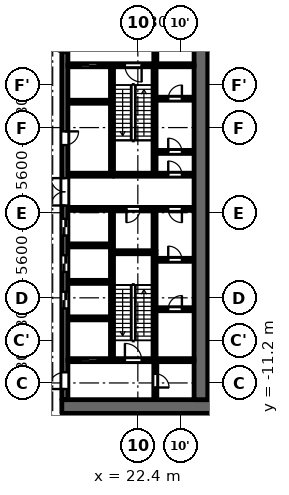
"""IFC4 building model, lengths in metres.
Left out: names, types, materials, properties, quantities, classifications, styles, units other than length and angle.
Written with IfcOpenShell. Run it as: python <this file> out.ifc"""

import sys

from ifc_helpers import new_model, si_unit, direction, frame, frame_2d, origin, place, context, subcontext, project, spatial, rectangle, extrude, element, fill, save


model = new_model("IFC4")
c1 = context("Model", 3, precision=1e-05, world=origin(), true_north=direction((0.0, 1.0)))
c2 = subcontext(c1, "Body", "Model", "MODEL_VIEW")
j1 = project(units=[si_unit("LENGTHUNIT", "METRE"), si_unit("PLANEANGLEUNIT", "RADIAN")], contexts=[c1])
p1 = place(None, origin())
s1 = spatial("IfcSite", under=j1, at=p1, CompositionType="ELEMENT")
p2 = place(p1, origin())
s2 = spatial("IfcBuilding", under=s1, at=p2, CompositionType="ELEMENT")
p3 = place(p2, frame((0.0, 0.0, 25.7)))
s3 = spatial("IfcBuildingStorey", under=s2, at=p3, CompositionType="ELEMENT", Elevation=25.7)
p4 = place(p3, frame((23.5, -2.5, 0.0), z_axis=(0.0, 0.0, 1.0), x_axis=(0.0, 1.0, 0.0)))
e1 = element("IfcWall", 1, at=p4, inside=s3, PredefinedType="PARTITIONING", context=c2, shape_type="SweptSolid", body=[
    extrude(rectangle(XDim=2.65, YDim=0.2, at=frame_2d((1.325, 0.0))), origin(), (0.0, 0.0, 1.0), 4.45),
])
p5 = place(p3, frame((20.7, 2.6, 0.0), z_axis=(0.0, 0.0, 1.0), x_axis=(0.0, 1.0, 0.0)))
e2 = element("IfcWall", 2, at=p5, inside=s3, PredefinedType="SHEAR", context=c2, shape_type="SweptSolid", body=[
    extrude(rectangle(XDim=7.0, YDim=0.2, at=frame_2d((3.5, 0.0))), origin(), (0.0, 0.0, 1.0), 4.45),
])
p6 = place(p3, frame((20.7, -9.6, 0.0), z_axis=(0.0, 0.0, 1.0), x_axis=(0.0, 1.0, 0.0)))
e3 = element("IfcWall", 3, at=p6, inside=s3, PredefinedType="SHEAR", context=c2, shape_type="SweptSolid", body=[
    extrude(rectangle(XDim=9.75, YDim=0.2, at=frame_2d((4.875, 0.0))), origin(), (0.0, 0.0, 1.0), 4.45),
])
p7 = place(p3, frame((20.8, 2.5, 0.0), z_axis=(0.0, 0.0, 1.0), x_axis=(1.0, 0.0, 0.0)))
e4 = element("IfcWall", 4, at=p7, inside=s3, PredefinedType="SHEAR", context=c2, shape_type="SweptSolid", body=[
    extrude(rectangle(XDim=5.3, YDim=0.2, at=frame_2d((2.65, 0.0))), origin(), (0.0, 0.0, 1.0), 4.45),
])
p8 = place(p7, frame((3.6, 0.0, 0.0)))
e5 = element("IfcOpeningElement", 5, at=p8, cuts=e4, PredefinedType="OPENING", context=c2, shape_type="SweptSolid", body=[
    extrude(rectangle(XDim=0.9, YDim=2.1, at=frame_2d((0.45, 1.05))), frame((0.0, 0.11, 0.0), z_axis=(0.0, -1.0, 0.0), x_axis=(1.0, 0.0, 0.0)), (0.0, 0.0, 1.0), 0.22),
])
p9 = place(p3, frame((20.8, 0.25, 0.0), z_axis=(0.0, 0.0, 1.0), x_axis=(1.0, 0.0, 0.0)))
e6 = element("IfcWall", 6, at=p9, inside=s3, PredefinedType="PARTITIONING", context=c2, shape_type="SweptSolid", body=[
    extrude(rectangle(XDim=5.3, YDim=0.2, at=frame_2d((2.65, 0.0))), origin(), (0.0, 0.0, 1.0), 4.45),
])
p10 = place(p9, frame((0.85, 0.0, 0.0)))
e7 = element("IfcOpeningElement", 7, at=p10, cuts=e6, PredefinedType="OPENING", context=c2, shape_type="SweptSolid", body=[
    extrude(rectangle(XDim=0.9, YDim=2.1, at=frame_2d((0.45, 1.05))), frame((0.0, 0.11, 0.0), z_axis=(0.0, -1.0, 0.0), x_axis=(1.0, 0.0, 0.0)), (0.0, 0.0, 1.0), 0.22),
])
p11 = place(p9, frame((3.6, 0.0, 0.0)))
e8 = element("IfcOpeningElement", 8, at=p11, cuts=e6, PredefinedType="OPENING", context=c2, shape_type="SweptSolid", body=[
    extrude(rectangle(XDim=0.9, YDim=2.1, at=frame_2d((0.45, 1.05))), frame((0.0, 0.11, 0.0), z_axis=(0.0, -1.0, 0.0), x_axis=(1.0, 0.0, 0.0)), (0.0, 0.0, 1.0), 0.22),
])
p12 = place(p3, frame((17.4, -12.75, 0.0), z_axis=(0.0, 0.0, 1.0), x_axis=(1.0, 0.0, 0.0)))
e9 = element("IfcWall", 9, at=p12, inside=s3, PredefinedType="SHEAR", context=c2, shape_type="SweptSolid", body=[
    extrude(rectangle(XDim=10.4, YDim=0.9, at=frame_2d((5.2, 0.0))), origin(), (0.0, 0.0, 1.0), 4.45),
])
p13 = place(p3, frame((17.6, -12.3, 0.0), z_axis=(0.0, 0.0, 1.0), x_axis=(0.0, 1.0, 0.0)))
e10 = element("IfcWall", 10, at=p13, inside=s3, PredefinedType="SHEAR", context=c2, shape_type="SweptSolid", body=[
    extrude(rectangle(XDim=24.6, YDim=0.4, at=frame_2d((12.3, 0.0))), origin(), (0.0, 0.0, 1.0), 4.45),
])
p14 = place(p13, frame((6.0, 0.0, 0.0)))
e11 = element("IfcOpeningElement", 11, at=p14, cuts=e10, PredefinedType="OPENING", context=c2, shape_type="SweptSolid", body=[
    extrude(rectangle(XDim=1.1, YDim=2.1, at=frame_2d((0.55, 1.05))), frame((0.0, 0.21, 0.0), z_axis=(0.0, -1.0, 0.0), x_axis=(1.0, 0.0, 0.0)), (0.0, 0.0, 1.0), 0.42),
])
p15 = place(p13, frame((8.4, 0.0, 0.0)))
e12 = element("IfcOpeningElement", 12, at=p15, cuts=e10, PredefinedType="OPENING", context=c2, shape_type="SweptSolid", body=[
    extrude(rectangle(XDim=1.1, YDim=2.1, at=frame_2d((0.55, 1.05))), frame((0.0, 0.21, 0.0), z_axis=(0.0, -1.0, 0.0), x_axis=(1.0, 0.0, 0.0)), (0.0, 0.0, 1.0), 0.42),
])
p16 = place(p13, frame((10.8, 0.0, 0.0)))
e13 = element("IfcOpeningElement", 13, at=p16, cuts=e10, PredefinedType="OPENING", context=c2, shape_type="SweptSolid", body=[
    extrude(rectangle(XDim=1.1, YDim=2.1, at=frame_2d((0.55, 1.05))), frame((0.0, 0.21, 0.0), z_axis=(0.0, -1.0, 0.0), x_axis=(1.0, 0.0, 0.0)), (0.0, 0.0, 1.0), 0.42),
])
p17 = place(p13, frame((16.75, 0.0, 0.0)))
e14 = element("IfcOpeningElement", 14, at=p17, cuts=e10, PredefinedType="OPENING", context=c2, shape_type="SweptSolid", body=[
    extrude(rectangle(XDim=0.9, YDim=2.1, at=frame_2d((0.45, 1.05))), frame((0.0, 0.21, 0.0), z_axis=(0.0, -1.0, 0.0), x_axis=(1.0, 0.0, 0.0)), (0.0, 0.0, 1.0), 0.42),
])
p18 = place(p13, frame((22.8, 0.0, 0.0)))
e15 = element("IfcOpeningElement", 15, at=p18, cuts=e10, PredefinedType="OPENING", context=c2, shape_type="SweptSolid", body=[
    extrude(rectangle(XDim=1.1, YDim=2.1, at=frame_2d((0.55, 1.05))), frame((0.0, 0.21, 0.0), z_axis=(0.0, -1.0, 0.0), x_axis=(1.0, 0.0, 0.0)), (0.0, 0.0, 1.0), 0.42),
])
p19 = place(p13, frame((0.7, 0.0, 0.0)))
e16 = element("IfcOpeningElement", 16, at=p19, cuts=e10, PredefinedType="OPENING", context=c2, shape_type="SweptSolid", body=[
    extrude(rectangle(XDim=1.1, YDim=2.1, at=frame_2d((0.55, 1.05))), frame((0.0, 0.21, 0.0), z_axis=(0.0, -1.0, 0.0), x_axis=(1.0, 0.0, 0.0)), (0.0, 0.0, 1.0), 0.42),
])
p20 = place(p13, frame((12.775, 0.0, 0.0)))
e17 = element("IfcOpeningElement", 17, at=p20, cuts=e10, PredefinedType="OPENING", context=c2, shape_type="SweptSolid", body=[
    extrude(rectangle(XDim=1.8, YDim=2.1, at=frame_2d((0.9, 1.05))), frame((0.0, 0.21, 0.0), z_axis=(0.0, -1.0, 0.0), x_axis=(1.0, 0.0, 0.0)), (0.0, 0.0, 1.0), 0.42),
])
p21 = place(p3, frame((26.55, -12.3, 0.0), z_axis=(0.0, 0.0, 1.0), x_axis=(0.0, 1.0, 0.0)))
e18 = element("IfcWall", 18, at=p21, inside=s3, PredefinedType="SHEAR", context=c2, shape_type="SweptSolid", body=[
    extrude(rectangle(XDim=24.6, YDim=0.9, at=frame_2d((12.3, 0.0))), origin(), (0.0, 0.0, 1.0), 4.45),
])
p22 = place(p3, frame((23.55, 9.8, 0.0), z_axis=(0.0, 0.0, 1.0), x_axis=(0.0, 1.0, 0.0)))
e19 = element("IfcWall", 19, at=p22, inside=s3, PredefinedType="PARTITIONING", context=c2, shape_type="SweptSolid", body=[
    extrude(rectangle(XDim=2.5, YDim=0.2, at=frame_2d((1.25, 0.0))), origin(), (0.0, 0.0, 1.0), 4.45),
])
p23 = place(p22, frame((0.8, 0.0, 0.0)))
e20 = element("IfcOpeningElement", 20, at=p23, cuts=e19, PredefinedType="OPENING", context=c2, shape_type="SweptSolid", body=[
    extrude(rectangle(XDim=0.9, YDim=2.1, at=frame_2d((0.45, 1.05))), frame((0.0, 0.11, 0.0), z_axis=(0.0, -1.0, 0.0), x_axis=(1.0, 0.0, 0.0)), (0.0, 0.0, 1.0), 0.22),
])
p24 = place(p3, frame((23.55, -12.3, 0.0), z_axis=(0.0, 0.0, 1.0), x_axis=(0.0, 1.0, 0.0)))
e21 = element("IfcWall", 21, at=p24, inside=s3, PredefinedType="PARTITIONING", context=c2, shape_type="SweptSolid", body=[
    extrude(rectangle(XDim=2.5, YDim=0.2, at=frame_2d((1.25, 0.0))), origin(), (0.0, 0.0, 1.0), 4.45),
])
p25 = place(p24, frame((0.8, 0.0, 0.0)))
e22 = element("IfcOpeningElement", 22, at=p25, cuts=e21, PredefinedType="OPENING", context=c2, shape_type="SweptSolid", body=[
    extrude(rectangle(XDim=0.9, YDim=2.1, at=frame_2d((0.45, 1.05))), frame((0.0, 0.11, 0.0), z_axis=(0.0, -1.0, 0.0), x_axis=(1.0, 0.0, 0.0)), (0.0, 0.0, 1.0), 0.22),
])
p26 = place(p3, frame((23.6, -6.35, 0.0), z_axis=(0.0, 0.0, 1.0), x_axis=(1.0, 0.0, 0.0)))
e23 = element("IfcWall", 23, at=p26, inside=s3, PredefinedType="PARTITIONING", context=c2, shape_type="SweptSolid", body=[
    extrude(rectangle(XDim=2.5, YDim=0.2, at=frame_2d((1.25, 0.0))), origin(), (0.0, 0.0, 1.0), 4.45),
])
p27 = place(p26, frame((0.8, 0.0, 0.0)))
e24 = element("IfcOpeningElement", 24, at=p27, cuts=e23, PredefinedType="OPENING", context=c2, shape_type="SweptSolid", body=[
    extrude(rectangle(XDim=0.9, YDim=2.1, at=frame_2d((0.45, 1.05))), frame((0.0, 0.11, 0.0), z_axis=(0.0, -1.0, 0.0), x_axis=(1.0, 0.0, 0.0)), (0.0, 0.0, 1.0), 0.22),
])
p28 = place(p3, frame((23.6, -3.1, 0.0), z_axis=(0.0, 0.0, 1.0), x_axis=(1.0, 0.0, 0.0)))
e25 = element("IfcWall", 25, at=p28, inside=s3, PredefinedType="PARTITIONING", context=c2, shape_type="SweptSolid", body=[
    extrude(rectangle(XDim=2.5, YDim=0.2, at=frame_2d((1.25, 0.0))), origin(), (0.0, 0.0, 1.0), 4.45),
])
p29 = place(p28, frame((0.8, 0.0, 0.0)))
e26 = element("IfcOpeningElement", 26, at=p29, cuts=e25, PredefinedType="OPENING", context=c2, shape_type="SweptSolid", body=[
    extrude(rectangle(XDim=0.9, YDim=2.1, at=frame_2d((0.45, 1.05))), frame((0.0, 0.11, 0.0), z_axis=(0.0, -1.0, 0.0), x_axis=(1.0, 0.0, 0.0)), (0.0, 0.0, 1.0), 0.22),
])
p30 = place(p3, frame((23.6, 4.0, 0.0), z_axis=(0.0, 0.0, 1.0), x_axis=(1.0, 0.0, 0.0)))
e27 = element("IfcWall", 27, at=p30, inside=s3, PredefinedType="PARTITIONING", context=c2, shape_type="SweptSolid", body=[
    extrude(rectangle(XDim=2.5, YDim=0.2, at=frame_2d((1.25, 0.0))), origin(), (0.0, 0.0, 1.0), 4.45),
])
p31 = place(p30, frame((0.8, 0.0, 0.0)))
e28 = element("IfcOpeningElement", 28, at=p31, cuts=e27, PredefinedType="OPENING", context=c2, shape_type="SweptSolid", body=[
    extrude(rectangle(XDim=0.9, YDim=2.1, at=frame_2d((0.45, 1.05))), frame((0.0, 0.11, 0.0), z_axis=(0.0, -1.0, 0.0), x_axis=(1.0, 0.0, 0.0)), (0.0, 0.0, 1.0), 0.22),
])
p32 = place(p3, frame((23.6, 7.5, 0.0), z_axis=(0.0, 0.0, 1.0), x_axis=(1.0, 0.0, 0.0)))
e29 = element("IfcWall", 29, at=p32, inside=s3, PredefinedType="PARTITIONING", context=c2, shape_type="SweptSolid", body=[
    extrude(rectangle(XDim=2.5, YDim=0.2, at=frame_2d((1.25, 0.0))), origin(), (0.0, 0.0, 1.0), 4.45),
])
p33 = place(p32, frame((0.8, 0.0, 0.0)))
e30 = element("IfcOpeningElement", 30, at=p33, cuts=e29, PredefinedType="OPENING", context=c2, shape_type="SweptSolid", body=[
    extrude(rectangle(XDim=0.9, YDim=2.1, at=frame_2d((0.45, 1.05))), frame((0.0, 0.11, 0.0), z_axis=(0.0, -1.0, 0.0), x_axis=(1.0, 0.0, 0.0)), (0.0, 0.0, 1.0), 0.22),
])
p34 = place(p3, frame((17.8, -9.7, 0.0), z_axis=(0.0, 0.0, 1.0), x_axis=(1.0, 0.0, 0.0)))
e31 = element("IfcWall", 31, at=p34, inside=s3, PredefinedType="SHEAR", context=c2, shape_type="SweptSolid", body=[
    extrude(rectangle(XDim=8.3, YDim=0.2, at=frame_2d((4.15, 0.0))), origin(), (0.0, 0.0, 1.0), 4.45),
])
p35 = place(p34, frame((0.85, 0.0, 0.0)))
e32 = element("IfcOpeningElement", 32, at=p35, cuts=e31, PredefinedType="OPENING", context=c2, shape_type="SweptSolid", body=[
    extrude(rectangle(XDim=1.1, YDim=2.1, at=frame_2d((0.55, 1.05))), frame((0.0, 0.11, 0.0), z_axis=(0.0, -1.0, 0.0), x_axis=(1.0, 0.0, 0.0)), (0.0, 0.0, 1.0), 0.22),
])
p36 = place(p34, frame((3.75, 0.0, 0.0)))
e33 = element("IfcOpeningElement", 33, at=p36, cuts=e31, PredefinedType="OPENING", context=c2, shape_type="SweptSolid", body=[
    extrude(rectangle(XDim=1.1, YDim=2.1, at=frame_2d((0.55, 1.05))), frame((0.0, 0.11, 0.0), z_axis=(0.0, -1.0, 0.0), x_axis=(1.0, 0.0, 0.0)), (0.0, 0.0, 1.0), 0.22),
])
for number, where, z_axis, x_axis in (
    (34, (17.8, -6.95, 0.0), (0.0, 0.0, 1.0), (1.0, 0.0, 0.0)),
    (35, (17.8, -4.55, 0.0), (0.0, 0.0, 1.0), (1.0, 0.0, 0.0)),
    (36, (17.8, -2.15, 0.0), (0.0, 0.0, 1.0), (1.0, 0.0, 0.0)),
):
    element("IfcWall", number, at=place(p3, frame(where, z_axis=z_axis, x_axis=x_axis)), inside=s3, PredefinedType="PARTITIONING", context=c2, shape_type="SweptSolid", body=[
        extrude(rectangle(XDim=2.8, YDim=0.2, at=frame_2d((1.4, 0.0))), origin(), (0.0, 0.0, 1.0), 4.45),
    ])
for number, where, z_axis, x_axis in (
    (37, (17.8, 0.25, 0.0), (0.0, 0.0, 1.0), (1.0, 0.0, 0.0)),
    (38, (17.8, 2.5, 0.0), (0.0, 0.0, 1.0), (1.0, 0.0, 0.0)),
):
    element("IfcWall", number, at=place(p3, frame(where, z_axis=z_axis, x_axis=x_axis)), inside=s3, PredefinedType="PARTITIONING", context=c2, shape_type="SweptSolid", body=[
        extrude(rectangle(XDim=3.0, YDim=0.2, at=frame_2d((1.5, 0.0))), origin(), (0.0, 0.0, 1.0), 4.45),
    ])
p37 = place(p3, frame((17.8, 7.3, 0.0), z_axis=(0.0, 0.0, 1.0), x_axis=(1.0, 0.0, 0.0)))
e39 = element("IfcWall", 39, at=p37, inside=s3, PredefinedType="PARTITIONING", context=c2, shape_type="SweptSolid", body=[
    extrude(rectangle(XDim=2.8, YDim=0.2, at=frame_2d((1.4, 0.0))), origin(), (0.0, 0.0, 1.0), 4.45),
])
p38 = place(p3, frame((17.8, 9.7, 0.0), z_axis=(0.0, 0.0, 1.0), x_axis=(1.0, 0.0, 0.0)))
e40 = element("IfcWall", 40, at=p38, inside=s3, PredefinedType="SHEAR", context=c2, shape_type="SweptSolid", body=[
    extrude(rectangle(XDim=8.3, YDim=0.2, at=frame_2d((4.15, 0.0))), origin(), (0.0, 0.0, 1.0), 4.45),
])
p39 = place(p38, frame((0.85, 0.0, 0.0)))
e41 = element("IfcOpeningElement", 41, at=p39, cuts=e40, PredefinedType="OPENING", context=c2, shape_type="SweptSolid", body=[
    extrude(rectangle(XDim=1.1, YDim=2.1, at=frame_2d((0.55, 1.05))), frame((0.0, 0.11, 0.0), z_axis=(0.0, -1.0, 0.0), x_axis=(1.0, 0.0, 0.0)), (0.0, 0.0, 1.0), 0.22),
])
p40 = place(p38, frame((3.75, 0.0, 0.0)))
e42 = element("IfcOpeningElement", 42, at=p40, cuts=e40, PredefinedType="OPENING", context=c2, shape_type="SweptSolid", body=[
    extrude(rectangle(XDim=1.1, YDim=2.1, at=frame_2d((0.55, 1.05))), frame((0.0, 0.11, 0.0), z_axis=(0.0, -1.0, 0.0), x_axis=(1.0, 0.0, 0.0)), (0.0, 0.0, 1.0), 0.22),
])
p41 = place(p3, frame((23.5, 2.6, 0.0), z_axis=(0.0, 0.0, 1.0), x_axis=(0.0, 1.0, 0.0)))
e43 = element("IfcWall", 43, at=p41, inside=s3, PredefinedType="SHEAR", context=c2, shape_type="SweptSolid", body=[
    extrude(rectangle(XDim=7.0, YDim=0.2, at=frame_2d((3.5, 0.0))), origin(), (0.0, 0.0, 1.0), 4.45),
])
p42 = place(p3, frame((23.5, -9.6, 0.0), z_axis=(0.0, 0.0, 1.0), x_axis=(0.0, 1.0, 0.0)))
e44 = element("IfcWall", 44, at=p42, inside=s3, PredefinedType="SHEAR", context=c2, shape_type="SweptSolid", body=[
    extrude(rectangle(XDim=6.9, YDim=0.2, at=frame_2d((3.45, 0.0))), origin(), (0.0, 0.0, 1.0), 4.45),
])
p43 = place(p3, frame((20.8, -2.6, 0.0), z_axis=(0.0, 0.0, 1.0), x_axis=(1.0, 0.0, 0.0)))
e45 = element("IfcWall", 45, at=p43, inside=s3, PredefinedType="SHEAR", context=c2, shape_type="SweptSolid", body=[
    extrude(rectangle(XDim=2.8, YDim=0.2, at=frame_2d((1.4, 0.0))), origin(), (0.0, 0.0, 1.0), 4.45),
])
p44 = place(p35, origin())
e46 = element("IfcDoor", 46, at=p44, inside=s3, OperationType="DOUBLE_DOOR_SLIDING", PredefinedType="DOOR", context=c2, shape_type="SweptSolid", body=[
    extrude(rectangle(XDim=1.1, YDim=2.1, at=frame_2d((0.55, 1.05))), frame((0.0, 0.025, 0.0), z_axis=(0.0, -1.0, 0.0), x_axis=(1.0, 0.0, 0.0)), (0.0, 0.0, 1.0), 0.05),
])
fill(e32, e46)
p45 = place(p14, origin())
e47 = element("IfcDoor", 47, at=p45, inside=s3, OperationType="DOUBLE_DOOR_SLIDING", PredefinedType="DOOR", context=c2, shape_type="SweptSolid", body=[
    extrude(rectangle(XDim=1.1, YDim=2.1, at=frame_2d((0.55, 1.05))), frame((0.0, 0.025, 0.0), z_axis=(0.0, -1.0, 0.0), x_axis=(1.0, 0.0, 0.0)), (0.0, 0.0, 1.0), 0.05),
])
fill(e11, e47)
p46 = place(p15, origin())
e48 = element("IfcDoor", 48, at=p46, inside=s3, OperationType="DOUBLE_DOOR_SLIDING", PredefinedType="DOOR", context=c2, shape_type="SweptSolid", body=[
    extrude(rectangle(XDim=1.1, YDim=2.1, at=frame_2d((0.55, 1.05))), frame((0.0, 0.025, 0.0), z_axis=(0.0, -1.0, 0.0), x_axis=(1.0, 0.0, 0.0)), (0.0, 0.0, 1.0), 0.05),
])
fill(e12, e48)
p47 = place(p16, origin())
e49 = element("IfcDoor", 49, at=p47, inside=s3, OperationType="DOUBLE_DOOR_SLIDING", PredefinedType="DOOR", context=c2, shape_type="SweptSolid", body=[
    extrude(rectangle(XDim=1.1, YDim=2.1, at=frame_2d((0.55, 1.05))), frame((0.0, 0.025, 0.0), z_axis=(0.0, -1.0, 0.0), x_axis=(1.0, 0.0, 0.0)), (0.0, 0.0, 1.0), 0.05),
])
fill(e13, e49)
p48 = place(p17, origin())
e50 = element("IfcDoor", 50, at=p48, inside=s3, OperationType="SINGLE_SWING_RIGHT", PredefinedType="DOOR", context=c2, shape_type="SweptSolid", body=[
    extrude(rectangle(XDim=0.9, YDim=2.1, at=frame_2d((0.45, 1.05))), frame((0.0, 0.025, 0.0), z_axis=(0.0, -1.0, 0.0), x_axis=(1.0, 0.0, 0.0)), (0.0, 0.0, 1.0), 0.05),
])
fill(e14, e50)
p49 = place(p39, origin())
e51 = element("IfcDoor", 51, at=p49, inside=s3, OperationType="DOUBLE_DOOR_SLIDING", PredefinedType="DOOR", context=c2, shape_type="SweptSolid", body=[
    extrude(rectangle(XDim=1.1, YDim=2.1, at=frame_2d((0.55, 1.05))), frame((0.0, 0.025, 0.0), z_axis=(0.0, -1.0, 0.0), x_axis=(1.0, 0.0, 0.0)), (0.0, 0.0, 1.0), 0.05),
])
fill(e41, e51)
p50 = place(p18, origin())
e52 = element("IfcDoor", 52, at=p50, inside=s3, OperationType="SINGLE_SWING_LEFT", PredefinedType="DOOR", context=c2, shape_type="SweptSolid", body=[
    extrude(rectangle(XDim=1.1, YDim=2.1, at=frame_2d((0.55, 1.05))), frame((0.0, 0.025, 0.0), z_axis=(0.0, -1.0, 0.0), x_axis=(1.0, 0.0, 0.0)), (0.0, 0.0, 1.0), 0.05),
])
fill(e15, e52)
p51 = place(p19, origin())
e53 = element("IfcDoor", 53, at=p51, inside=s3, OperationType="SINGLE_SWING_RIGHT", PredefinedType="DOOR", context=c2, shape_type="SweptSolid", body=[
    extrude(rectangle(XDim=1.1, YDim=2.1, at=frame_2d((0.55, 1.05))), frame((0.0, 0.025, 0.0), z_axis=(0.0, -1.0, 0.0), x_axis=(1.0, 0.0, 0.0)), (0.0, 0.0, 1.0), 0.05),
])
fill(e16, e53)
p52 = place(p25, origin())
e54 = element("IfcDoor", 54, at=p52, inside=s3, OperationType="SINGLE_SWING_LEFT", PredefinedType="DOOR", context=c2, shape_type="SweptSolid", body=[
    extrude(rectangle(XDim=0.9, YDim=2.1, at=frame_2d((0.45, 1.05))), frame((0.0, 0.025, 0.0), z_axis=(0.0, -1.0, 0.0), x_axis=(1.0, 0.0, 0.0)), (0.0, 0.0, 1.0), 0.05),
])
fill(e22, e54)
p53 = place(p40, origin())
e55 = element("IfcDoor", 55, at=p53, inside=s3, OperationType="SINGLE_SWING_RIGHT", PredefinedType="DOOR", context=c2, shape_type="SweptSolid", body=[
    extrude(rectangle(XDim=1.1, YDim=2.1, at=frame_2d((0.55, 1.05))), frame((0.0, 0.025, 0.0), z_axis=(0.0, -1.0, 0.0), x_axis=(1.0, 0.0, 0.0)), (0.0, 0.0, 1.0), 0.05),
])
fill(e42, e55)
p54 = place(p36, origin())
e56 = element("IfcDoor", 56, at=p54, inside=s3, OperationType="SINGLE_SWING_RIGHT", PredefinedType="DOOR", context=c2, shape_type="SweptSolid", body=[
    extrude(rectangle(XDim=1.1, YDim=2.1, at=frame_2d((0.55, 1.05))), frame((0.0, 0.025, 0.0), z_axis=(0.0, -1.0, 0.0), x_axis=(1.0, 0.0, 0.0)), (0.0, 0.0, 1.0), 0.05),
])
fill(e33, e56)
p55 = place(p20, origin())
e57 = element("IfcDoor", 57, at=p55, inside=s3, OperationType="DOUBLE_DOOR_SINGLE_SWING", PredefinedType="DOOR", context=c2, shape_type="SweptSolid", body=[
    extrude(rectangle(XDim=1.8, YDim=2.1, at=frame_2d((0.9, 1.05))), frame((0.0, 0.025, 0.0), z_axis=(0.0, -1.0, 0.0), x_axis=(1.0, 0.0, 0.0)), (0.0, 0.0, 1.0), 0.05),
])
fill(e17, e57)
p56 = place(p10, origin())
e58 = element("IfcDoor", 58, at=p56, inside=s3, OperationType="SINGLE_SWING_LEFT", PredefinedType="DOOR", context=c2, shape_type="SweptSolid", body=[
    extrude(rectangle(XDim=0.9, YDim=2.1, at=frame_2d((0.45, 1.05))), frame((0.0, 0.025, 0.0), z_axis=(0.0, -1.0, 0.0), x_axis=(1.0, 0.0, 0.0)), (0.0, 0.0, 1.0), 0.05),
])
fill(e7, e58)
p57 = place(p27, origin())
e59 = element("IfcDoor", 59, at=p57, inside=s3, OperationType="SINGLE_SWING_LEFT", PredefinedType="DOOR", context=c2, shape_type="SweptSolid", body=[
    extrude(rectangle(XDim=0.9, YDim=2.1, at=frame_2d((0.45, 1.05))), frame((0.0, 0.025, 0.0), z_axis=(0.0, -1.0, 0.0), x_axis=(1.0, 0.0, 0.0)), (0.0, 0.0, 1.0), 0.05),
])
fill(e24, e59)
p58 = place(p29, origin())
e60 = element("IfcDoor", 60, at=p58, inside=s3, OperationType="SINGLE_SWING_RIGHT", PredefinedType="DOOR", context=c2, shape_type="SweptSolid", body=[
    extrude(rectangle(XDim=0.9, YDim=2.1, at=frame_2d((0.45, 1.05))), frame((0.0, 0.025, 0.0), z_axis=(0.0, -1.0, 0.0), x_axis=(1.0, 0.0, 0.0)), (0.0, 0.0, 1.0), 0.05),
])
fill(e26, e60)
p59 = place(p11, origin())
e61 = element("IfcDoor", 61, at=p59, inside=s3, OperationType="SINGLE_SWING_RIGHT", PredefinedType="DOOR", context=c2, shape_type="SweptSolid", body=[
    extrude(rectangle(XDim=0.9, YDim=2.1, at=frame_2d((0.45, 1.05))), frame((0.0, 0.025, 0.0), z_axis=(0.0, -1.0, 0.0), x_axis=(1.0, 0.0, 0.0)), (0.0, 0.0, 1.0), 0.05),
])
fill(e8, e61)
p60 = place(p31, origin())
e62 = element("IfcDoor", 62, at=p60, inside=s3, OperationType="SINGLE_SWING_RIGHT", PredefinedType="DOOR", context=c2, shape_type="SweptSolid", body=[
    extrude(rectangle(XDim=0.9, YDim=2.1, at=frame_2d((0.45, 1.05))), frame((0.0, 0.025, 0.0), z_axis=(0.0, -1.0, 0.0), x_axis=(1.0, 0.0, 0.0)), (0.0, 0.0, 1.0), 0.05),
])
fill(e28, e62)
p61 = place(p33, origin())
e63 = element("IfcDoor", 63, at=p61, inside=s3, OperationType="SINGLE_SWING_LEFT", PredefinedType="DOOR", context=c2, shape_type="SweptSolid", body=[
    extrude(rectangle(XDim=0.9, YDim=2.1, at=frame_2d((0.45, 1.05))), frame((0.0, 0.025, 0.0), z_axis=(0.0, -1.0, 0.0), x_axis=(1.0, 0.0, 0.0)), (0.0, 0.0, 1.0), 0.05),
])
fill(e30, e63)
p62 = place(p8, origin())
e64 = element("IfcDoor", 64, at=p62, inside=s3, OperationType="SINGLE_SWING_RIGHT", PredefinedType="DOOR", context=c2, shape_type="SweptSolid", body=[
    extrude(rectangle(XDim=0.9, YDim=2.1, at=frame_2d((0.45, 1.05))), frame((0.0, 0.025, 0.0), z_axis=(0.0, -1.0, 0.0), x_axis=(1.0, 0.0, 0.0)), (0.0, 0.0, 1.0), 0.05),
])
fill(e5, e64)
save(model, sys.argv[1])
